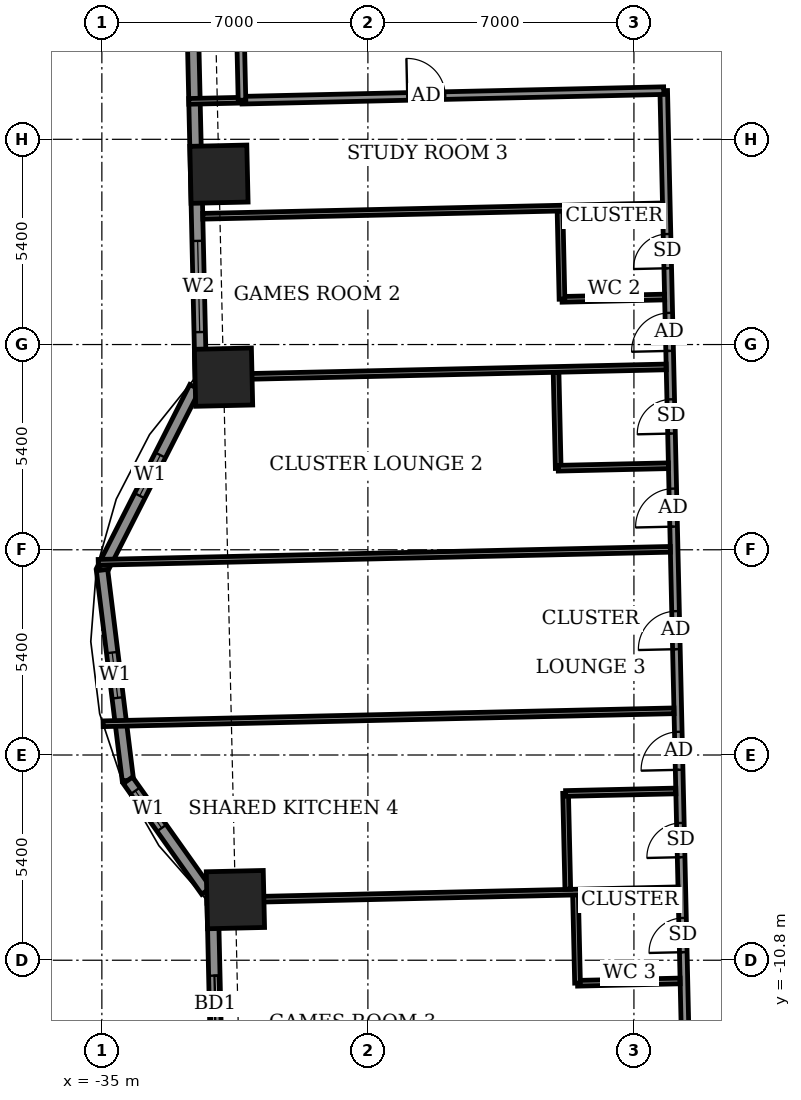
"""IFC4 building model, lengths in metres.
Left out: names, types, materials, properties, quantities, classifications, styles, units other than length and angle.
Written with IfcOpenShell. Run it as: python <this file> out.ifc"""

import sys

from ifc_helpers import new_model, si_unit, direction, frame, frame_2d, origin, origin_2d, place, context, subcontext, project, spatial, rectangle, extrude, element, fill, save


model = new_model("IFC4")
c1 = context("Model", 3, precision=1e-05, world=origin(), true_north=direction((0.0, 1.0)))
c2 = subcontext(c1, "Body", "Model", "MODEL_VIEW")
j1 = project(units=[si_unit("LENGTHUNIT", "METRE"), si_unit("PLANEANGLEUNIT", "RADIAN")], contexts=[c1])
p1 = place(None, origin())
s1 = spatial("IfcSite", under=j1, at=p1, CompositionType="ELEMENT")
p2 = place(p1, origin())
s2 = spatial("IfcBuilding", under=s1, at=p2, CompositionType="ELEMENT")
p3 = place(p2, frame((0.0, 0.0, 48.5)))
s3 = spatial("IfcBuildingStorey", under=s2, at=p3, CompositionType="ELEMENT", Elevation=48.5)
for number, where, z_axis, x_axis in (
    (1, (-31.486, -9.205, -0.55), (0.0, 0.0, 1.0), (0.023, -1.0, 0.0)),
    (2, (-31.919, 9.882, -0.55), (0.0, 0.0, 1.0), (0.023, -1.0, 0.0)),
    (3, (-31.798, 4.542, -0.55), (0.0, 0.0, 1.0), (0.023, -1.0, 0.0)),
):
    element("IfcColumn", number, at=place(p3, frame(where, z_axis=z_axis, x_axis=x_axis)), inside=s3, PredefinedType="COLUMN", context=c2, shape_type="SweptSolid", body=[
        extrude(rectangle(XDim=1.5, YDim=1.5, at=origin_2d()), origin(), (0.0, 0.0, 1.0), 3.6),
    ])
p4 = place(p3, frame((-32.758, 20.399, 0.0), z_axis=(0.0, 0.0, 1.0), x_axis=(0.022668485183, -0.999743036875, 0.0)))
e4 = element("IfcWall", 4, at=p4, inside=s3, PredefinedType="SOLIDWALL", context=c2, shape_type="SweptSolid", body=[
    extrude(rectangle(XDim=15.929, YDim=0.3, at=frame_2d((7.964, 0.0))), origin(), (0.0, 0.0, 1.0), 3.05),
])
p5 = place(p4, frame((2.17, 0.0, 0.0)))
e5 = element("IfcOpeningElement", 5, at=p5, cuts=e4, PredefinedType="OPENING", context=c2, shape_type="SweptSolid", body=[
    extrude(rectangle(XDim=1.5, YDim=2.4, at=frame_2d((0.75, 1.2))), frame((0.0, 0.16, 0.0), z_axis=(0.0, -1.0, 0.0), x_axis=(1.0, 0.0, 0.0)), (0.0, 0.0, 1.0), 0.32),
])
p6 = place(p4, frame((12.275, 0.0, 0.9)))
e6 = element("IfcOpeningElement", 6, at=p6, cuts=e4, PredefinedType="OPENING", context=c2, shape_type="SweptSolid", body=[
    extrude(rectangle(XDim=2.4, YDim=1.5, at=frame_2d((1.2, 0.75))), frame((0.0, 0.16, 0.0), z_axis=(0.0, -1.0, 0.0), x_axis=(1.0, 0.0, 0.0)), (0.0, 0.0, 1.0), 0.32),
])
p7 = place(p3, frame((-32.552, 4.28, 0.0), z_axis=(0.0, 0.0, 1.0), x_axis=(-0.452703975507, -0.891660871946, 0.0)))
e7 = element("IfcWall", 7, at=p7, inside=s3, PredefinedType="SOLIDWALL", context=c2, shape_type="SweptSolid", body=[
    extrude(rectangle(XDim=5.399, YDim=0.3, at=frame_2d((2.699, 0.0))), origin(), (0.0, 0.0, 1.0), 3.05),
])
p8 = place(p7, frame((2.007, 0.0, 0.9)))
e8 = element("IfcOpeningElement", 8, at=p8, cuts=e7, PredefinedType="OPENING", context=c2, shape_type="SweptSolid", body=[
    extrude(rectangle(XDim=1.2, YDim=1.5, at=frame_2d((0.6, 0.75))), frame((0.0, 0.16, 0.0), z_axis=(0.0, -1.0, 0.0), x_axis=(1.0, 0.0, 0.0)), (0.0, 0.0, 1.0), 0.32),
])
p9 = place(p3, frame((-34.996, -0.534, 0.0), z_axis=(0.0, 0.0, 1.0), x_axis=(0.122206978992, -0.992504636909, 0.0)))
e9 = element("IfcWall", 9, at=p9, inside=s3, PredefinedType="SOLIDWALL", context=c2, shape_type="SweptSolid", body=[
    extrude(rectangle(XDim=5.574, YDim=0.3, at=frame_2d((2.787, 0.0))), origin(), (0.0, 0.0, 1.0), 3.05),
])
p10 = place(p9, frame((2.187, 0.0, 0.9)))
e10 = element("IfcOpeningElement", 10, at=p10, cuts=e9, PredefinedType="OPENING", context=c2, shape_type="SweptSolid", body=[
    extrude(rectangle(XDim=1.2, YDim=1.5, at=frame_2d((0.6, 0.75))), frame((0.0, 0.16, 0.0), z_axis=(0.0, -1.0, 0.0), x_axis=(1.0, 0.0, 0.0)), (0.0, 0.0, 1.0), 0.32),
])
p11 = place(p3, frame((-34.315, -6.066, 0.0), z_axis=(0.0, 0.0, 1.0), x_axis=(0.578062893695, -0.815992212544, 0.0)))
e11 = element("IfcWall", 11, at=p11, inside=s3, PredefinedType="SOLIDWALL", context=c2, shape_type="SweptSolid", body=[
    extrude(rectangle(XDim=3.569, YDim=0.3, at=frame_2d((1.784, 0.0))), origin(), (0.0, 0.0, 1.0), 3.05),
])
p12 = place(p11, frame((0.338, 0.0, 0.9)))
e12 = element("IfcOpeningElement", 12, at=p12, cuts=e11, PredefinedType="OPENING", context=c2, shape_type="SweptSolid", body=[
    extrude(rectangle(XDim=1.2, YDim=1.5, at=frame_2d((0.6, 0.75))), frame((0.0, 0.16, 0.0), z_axis=(0.0, -1.0, 0.0), x_axis=(1.0, 0.0, 0.0)), (0.0, 0.0, 1.0), 0.32),
])
p13 = place(p3, frame((-32.087, -9.164, 0.0), z_axis=(0.0, 0.0, 1.0), x_axis=(0.022651102902, -0.999743430855, 0.0)))
e13 = element("IfcWall", 13, at=p13, inside=s3, PredefinedType="SOLIDWALL", context=c2, shape_type="SweptSolid", body=[
    extrude(rectangle(XDim=16.329, YDim=0.3, at=frame_2d((8.165, 0.0))), origin(), (0.0, 0.0, 1.0), 3.05),
])
p14 = place(p13, frame((2.042, 0.0, 0.0)))
e14 = element("IfcOpeningElement", 14, at=p14, cuts=e13, PredefinedType="OPENING", context=c2, shape_type="SweptSolid", body=[
    extrude(rectangle(XDim=1.5, YDim=2.4, at=frame_2d((0.75, 1.2))), frame((0.0, 0.16, 0.0), z_axis=(0.0, -1.0, 0.0), x_axis=(1.0, 0.0, 0.0)), (0.0, 0.0, 1.0), 0.32),
])
p15 = place(p13, frame((7.367, 0.0, 0.9)))
e15 = element("IfcOpeningElement", 15, at=p15, cuts=e13, PredefinedType="OPENING", context=c2, shape_type="SweptSolid", body=[
    extrude(rectangle(XDim=2.4, YDim=1.5, at=frame_2d((1.2, 0.75))), frame((0.0, 0.16, 0.0), z_axis=(0.0, -1.0, 0.0), x_axis=(1.0, 0.0, 0.0)), (0.0, 0.0, 1.0), 0.32),
])
p16 = place(p3, frame((-34.032, 12.618, 0.0), z_axis=(0.0, 0.0, 1.0), x_axis=(-0.022662255828, 0.999743178102, 0.0)))
e16 = element("IfcWall", 16, at=p16, inside=s3, PredefinedType="USERDEFINED", context=c2, shape_type="SweptSolid", body=[
    extrude(rectangle(XDim=6.0, YDim=0.55, at=frame_2d((3.0, 0.0))), origin(), (0.0, 0.0, 1.0), 0.8),
])
p17 = place(p3, frame((-19.589, -15.562, 0.0), z_axis=(0.0, 0.0, 1.0), x_axis=(-0.02267447203, 0.999742901109, 0.0)))
e17 = element("IfcWall", 17, at=p17, inside=s3, PredefinedType="PARTITIONING", context=c2, shape_type="SweptSolid", body=[
    extrude(rectangle(XDim=27.65, YDim=0.2, at=frame_2d((13.825, 0.0))), origin(), (0.0, 0.0, 1.0), 3.05),
])
p18 = place(p17, frame((20.8, 0.0, 0.0)))
e18 = element("IfcOpeningElement", 18, at=p18, cuts=e17, PredefinedType="OPENING", context=c2, shape_type="SweptSolid", body=[
    extrude(rectangle(XDim=1.0, YDim=2.1, at=frame_2d((0.5, 1.05))), frame((0.0, 0.11, 0.0), z_axis=(0.0, -1.0, 0.0), x_axis=(1.0, 0.0, 0.0)), (0.0, 0.0, 1.0), 0.22),
])
p19 = place(p17, frame((22.975, 0.0, 0.0)))
e19 = element("IfcOpeningElement", 19, at=p19, cuts=e17, PredefinedType="OPENING", context=c2, shape_type="SweptSolid", body=[
    extrude(rectangle(XDim=0.9, YDim=2.1, at=frame_2d((0.45, 1.05))), frame((0.0, 0.11, 0.0), z_axis=(0.0, -1.0, 0.0), x_axis=(1.0, 0.0, 0.0)), (0.0, 0.0, 1.0), 0.22),
])
p20 = place(p17, frame((16.175, 0.0, 0.0)))
e20 = element("IfcOpeningElement", 20, at=p20, cuts=e17, PredefinedType="OPENING", context=c2, shape_type="SweptSolid", body=[
    extrude(rectangle(XDim=1.0, YDim=2.1, at=frame_2d((0.5, 1.05))), frame((0.0, 0.11, 0.0), z_axis=(0.0, -1.0, 0.0), x_axis=(1.0, 0.0, 0.0)), (0.0, 0.0, 1.0), 0.22),
])
p21 = place(p17, frame((18.625, 0.0, 0.0)))
e21 = element("IfcOpeningElement", 21, at=p21, cuts=e17, PredefinedType="OPENING", context=c2, shape_type="SweptSolid", body=[
    extrude(rectangle(XDim=0.9, YDim=2.1, at=frame_2d((0.45, 1.05))), frame((0.0, 0.11, 0.0), z_axis=(0.0, -1.0, 0.0), x_axis=(1.0, 0.0, 0.0)), (0.0, 0.0, 1.0), 0.22),
])
p22 = place(p17, frame((12.95, 0.0, 0.0)))
e22 = element("IfcOpeningElement", 22, at=p22, cuts=e17, PredefinedType="OPENING", context=c2, shape_type="SweptSolid", body=[
    extrude(rectangle(XDim=1.0, YDim=2.1, at=frame_2d((0.5, 1.05))), frame((0.0, 0.11, 0.0), z_axis=(0.0, -1.0, 0.0), x_axis=(1.0, 0.0, 0.0)), (0.0, 0.0, 1.0), 0.22),
])
p23 = place(p17, frame((9.775, 0.0, 0.0)))
e23 = element("IfcOpeningElement", 23, at=p23, cuts=e17, PredefinedType="OPENING", context=c2, shape_type="SweptSolid", body=[
    extrude(rectangle(XDim=1.0, YDim=2.1, at=frame_2d((0.5, 1.05))), frame((0.0, 0.11, 0.0), z_axis=(0.0, -1.0, 0.0), x_axis=(1.0, 0.0, 0.0)), (0.0, 0.0, 1.0), 0.22),
])
p24 = place(p17, frame((7.475, 0.0, 0.0)))
e24 = element("IfcOpeningElement", 24, at=p24, cuts=e17, PredefinedType="OPENING", context=c2, shape_type="SweptSolid", body=[
    extrude(rectangle(XDim=0.9, YDim=2.1, at=frame_2d((0.45, 1.05))), frame((0.0, 0.11, 0.0), z_axis=(0.0, -1.0, 0.0), x_axis=(1.0, 0.0, 0.0)), (0.0, 0.0, 1.0), 0.22),
])
p25 = place(p17, frame((1.612, 0.0, 0.0)))
e25 = element("IfcOpeningElement", 25, at=p25, cuts=e17, PredefinedType="OPENING", context=c2, shape_type="SweptSolid", body=[
    extrude(rectangle(XDim=1.0, YDim=2.1, at=frame_2d((0.5, 1.05))), frame((0.0, 0.11, 0.0), z_axis=(0.0, -1.0, 0.0), x_axis=(1.0, 0.0, 0.0)), (0.0, 0.0, 1.0), 0.22),
])
p26 = place(p17, frame((4.975, 0.0, 0.0)))
e26 = element("IfcOpeningElement", 26, at=p26, cuts=e17, PredefinedType="OPENING", context=c2, shape_type="SweptSolid", body=[
    extrude(rectangle(XDim=0.9, YDim=2.1, at=frame_2d((0.45, 1.05))), frame((0.0, 0.11, 0.0), z_axis=(0.0, -1.0, 0.0), x_axis=(1.0, 0.0, 0.0)), (0.0, 0.0, 1.0), 0.22),
])
p27 = place(p3, frame((-22.484, -11.406, 0.0), z_axis=(0.0, 0.0, 1.0), x_axis=(0.999744396973, 0.02260842146, 0.0)))
e27 = element("IfcWall", 27, at=p27, inside=s3, PredefinedType="PARTITIONING", context=c2, shape_type="SweptSolid", body=[
    extrude(rectangle(XDim=2.7, YDim=0.15, at=frame_2d((1.35, 0.0))), origin(), (0.0, 0.0, 1.0), 3.05),
])
p28 = place(p3, frame((-22.484, -11.401, 0.0), z_axis=(0.0, 0.0, 1.0), x_axis=(-0.022895561926, 0.999737862264, 0.0)))
e28 = element("IfcWall", 28, at=p28, inside=s3, PredefinedType="PARTITIONING", context=c2, shape_type="SweptSolid", body=[
    extrude(rectangle(XDim=2.324, YDim=0.15, at=frame_2d((1.162, 0.0))), origin(), (0.0, 0.0, 1.0), 3.05),
])
p29 = place(p3, frame((-32.236, -9.227, 0.0), z_axis=(0.0, 0.0, 1.0), x_axis=(0.999743195783, 0.022661475803, 0.0)))
e29 = element("IfcWall", 29, at=p29, inside=s3, PredefinedType="PARTITIONING", context=c2, shape_type="SweptSolid", body=[
    extrude(rectangle(XDim=12.4, YDim=0.15, at=frame_2d((6.2, 0.0))), origin(), (0.0, 0.0, 1.0), 3.05),
])
p30 = place(p3, frame((-22.74, -8.931, 0.0), z_axis=(0.0, 0.0, 1.0), x_axis=(-0.023015762656, 0.999735102249, 0.0)))
e30 = element("IfcWall", 30, at=p30, inside=s3, PredefinedType="PARTITIONING", context=c2, shape_type="SweptSolid", body=[
    extrude(rectangle(XDim=2.525, YDim=0.15, at=frame_2d((1.262, 0.0))), origin(), (0.0, 0.0, 1.0), 3.05),
])
p31 = place(p3, frame((-22.797, -6.412, 0.0), z_axis=(0.0, 0.0, 1.0), x_axis=(0.999739701447, 0.022815112345, 0.0)))
e31 = element("IfcWall", 31, at=p31, inside=s3, PredefinedType="PARTITIONING", context=c2, shape_type="SweptSolid", body=[
    extrude(rectangle(XDim=2.9, YDim=0.15, at=frame_2d((1.45, 0.0))), origin(), (0.0, 0.0, 1.0), 3.05),
])
p32 = place(p3, frame((-34.967, -4.578, 0.0), z_axis=(0.0, 0.0, 1.0), x_axis=(0.999742690494, 0.022683756395, 0.0)))
e32 = element("IfcWall", 32, at=p32, inside=s3, PredefinedType="PARTITIONING", context=c2, shape_type="SweptSolid", body=[
    extrude(rectangle(XDim=15.025, YDim=0.15, at=frame_2d((7.512, 0.0))), origin(), (0.0, 0.0, 1.0), 2.1),
])
p33 = place(p3, frame((-35.095, -0.33, 0.0), z_axis=(0.0, 0.0, 1.0), x_axis=(0.999741944356, 0.022716617157, 0.0)))
e33 = element("IfcWall", 33, at=p33, inside=s3, PredefinedType="PARTITIONING", context=c2, shape_type="SweptSolid", body=[
    extrude(rectangle(XDim=15.057, YDim=0.15, at=frame_2d((7.528, 0.0))), origin(), (0.0, 0.0, 1.0), 2.1),
])
p34 = place(p3, frame((-22.992, 2.141, 0.0), z_axis=(0.0, 0.0, 1.0), x_axis=(-0.022629142889, 0.99974392816, 0.0)))
e34 = element("IfcWall", 34, at=p34, inside=s3, PredefinedType="PARTITIONING", context=c2, shape_type="SweptSolid", body=[
    extrude(rectangle(XDim=2.525, YDim=0.15, at=frame_2d((1.262, 0.0))), origin(), (0.0, 0.0, 1.0), 3.05),
])
p35 = place(p3, frame((-22.992, 2.146, 0.0), z_axis=(0.0, 0.0, 1.0), x_axis=(0.999749340989, 0.022388729138, 0.0)))
e35 = element("IfcWall", 35, at=p35, inside=s3, PredefinedType="PARTITIONING", context=c2, shape_type="SweptSolid", body=[
    extrude(rectangle(XDim=2.901, YDim=0.15, at=frame_2d((1.45, 0.0))), origin(), (0.0, 0.0, 1.0), 3.05),
])
p36 = place(p3, frame((-32.248, 4.536, 0.0), z_axis=(0.0, 0.0, 1.0), x_axis=(0.999741439573, 0.022738821441, 0.0)))
e36 = element("IfcWall", 36, at=p36, inside=s3, PredefinedType="PARTITIONING", context=c2, shape_type="SweptSolid", body=[
    extrude(rectangle(XDim=12.1, YDim=0.15, at=frame_2d((6.05, 0.0))), origin(), (0.0, 0.0, 1.0), 3.05),
])
p37 = place(p3, frame((-22.892, 6.589, 0.0), z_axis=(0.0, 0.0, 1.0), x_axis=(0.999746436932, 0.022518033722, 0.0)))
e37 = element("IfcWall", 37, at=p37, inside=s3, PredefinedType="PARTITIONING", context=c2, shape_type="SweptSolid", body=[
    extrude(rectangle(XDim=2.7, YDim=0.15, at=frame_2d((1.35, 0.0))), origin(), (0.0, 0.0, 1.0), 3.05),
])
p38 = place(p3, frame((-22.893, 6.594, 0.0), z_axis=(0.0, 0.0, 1.0), x_axis=(-0.022370700241, 0.999749744571, 0.0)))
e38 = element("IfcWall", 38, at=p38, inside=s3, PredefinedType="PARTITIONING", context=c2, shape_type="SweptSolid", body=[
    extrude(rectangle(XDim=2.324, YDim=0.15, at=frame_2d((1.162, 0.0))), origin(), (0.0, 0.0, 1.0), 3.05),
])
p39 = place(p3, frame((-32.344, 8.775, 0.0), z_axis=(0.0, 0.0, 1.0), x_axis=(0.999741387404, 0.022741115019, 0.0)))
e39 = element("IfcWall", 39, at=p39, inside=s3, PredefinedType="PARTITIONING", context=c2, shape_type="SweptSolid", body=[
    extrude(rectangle(XDim=12.099, YDim=0.15, at=frame_2d((6.05, 0.0))), origin(), (0.0, 0.0, 1.0), 2.55),
])
p40 = place(p3, frame((-32.713, 11.798, 0.0), z_axis=(0.0, 0.0, 1.0), x_axis=(0.999756172383, 0.022081571112, 0.0)))
e40 = element("IfcWall", 40, at=p40, inside=s3, PredefinedType="PARTITIONING", context=c2, shape_type="SweptSolid", body=[
    extrude(rectangle(XDim=1.404, YDim=0.15, at=frame_2d((0.702, 0.0))), origin(), (0.0, 0.0, 1.0), 2.55),
])
p41 = place(p3, frame((-31.313, 11.829, 0.0), z_axis=(0.0, 0.0, 1.0), x_axis=(0.999742346277, 0.022698921993, 0.0)))
e41 = element("IfcWall", 41, at=p41, inside=s3, PredefinedType="PARTITIONING", context=c2, shape_type="SweptSolid", body=[
    extrude(rectangle(XDim=11.1, YDim=0.2, at=frame_2d((5.55, 0.0))), origin(), (0.0, 0.0, 1.0), 3.05),
])
p42 = place(p41, frame((4.35, 0.0, 0.0)))
e42 = element("IfcOpeningElement", 42, at=p42, cuts=e41, PredefinedType="OPENING", context=c2, shape_type="SweptSolid", body=[
    extrude(rectangle(XDim=1.0, YDim=2.1, at=frame_2d((0.5, 1.05))), frame((0.0, 0.11, 0.0), z_axis=(0.0, -1.0, 0.0), x_axis=(1.0, 0.0, 0.0)), (0.0, 0.0, 1.0), 0.22),
])
p43 = place(p3, frame((-31.313, 11.829, 0.0), z_axis=(0.0, 0.0, 1.0), x_axis=(-0.022617910375, 0.999744182344, 0.0)))
e43 = element("IfcWall", 43, at=p43, inside=s3, PredefinedType="PARTITIONING", context=c2, shape_type="SweptSolid", body=[
    extrude(rectangle(XDim=1.5, YDim=0.2, at=frame_2d((0.75, 0.0))), origin(), (0.0, 0.0, 1.0), 3.05),
])
p44 = place(p6, origin())
e44 = element("IfcWindow", 44, at=p44, inside=s3, PartitioningType="DOUBLE_PANEL_VERTICAL", PredefinedType="WINDOW", context=c2, shape_type="SweptSolid", body=[
    extrude(rectangle(XDim=2.4, YDim=1.5, at=frame_2d((1.2, 0.75))), frame((0.0, 0.03, 0.0), z_axis=(0.0, -1.0, 0.0), x_axis=(1.0, 0.0, 0.0)), (0.0, 0.0, 1.0), 0.06),
])
fill(e6, e44)
p45 = place(p8, origin())
e45 = element("IfcWindow", 45, at=p45, inside=s3, PartitioningType="SINGLE_PANEL", PredefinedType="WINDOW", context=c2, shape_type="SweptSolid", body=[
    extrude(rectangle(XDim=1.2, YDim=1.5, at=frame_2d((0.6, 0.75))), frame((0.0, 0.03, 0.0), z_axis=(0.0, -1.0, 0.0), x_axis=(1.0, 0.0, 0.0)), (0.0, 0.0, 1.0), 0.06),
])
fill(e8, e45)
p46 = place(p10, origin())
e46 = element("IfcWindow", 46, at=p46, inside=s3, PartitioningType="SINGLE_PANEL", PredefinedType="WINDOW", context=c2, shape_type="SweptSolid", body=[
    extrude(rectangle(XDim=1.2, YDim=1.5, at=frame_2d((0.6, 0.75))), frame((0.0, 0.03, 0.0), z_axis=(0.0, -1.0, 0.0), x_axis=(1.0, 0.0, 0.0)), (0.0, 0.0, 1.0), 0.06),
])
fill(e10, e46)
p47 = place(p12, origin())
e47 = element("IfcWindow", 47, at=p47, inside=s3, PartitioningType="SINGLE_PANEL", PredefinedType="WINDOW", context=c2, shape_type="SweptSolid", body=[
    extrude(rectangle(XDim=1.2, YDim=1.5, at=frame_2d((0.6, 0.75))), frame((0.0, 0.03, 0.0), z_axis=(0.0, -1.0, 0.0), x_axis=(1.0, 0.0, 0.0)), (0.0, 0.0, 1.0), 0.06),
])
fill(e12, e47)
p48 = place(p14, origin())
e48 = element("IfcDoor", 48, at=p48, inside=s3, OperationType="SLIDING_TO_LEFT", PredefinedType="DOOR", context=c2, shape_type="SweptSolid", body=[
    extrude(rectangle(XDim=1.5, YDim=2.4, at=frame_2d((0.75, 1.2))), frame((0.0, 0.025, 0.0), z_axis=(0.0, -1.0, 0.0), x_axis=(1.0, 0.0, 0.0)), (0.0, 0.0, 1.0), 0.05),
])
fill(e14, e48)
p49 = place(p42, origin())
e49 = element("IfcDoor", 49, at=p49, inside=s3, OperationType="SINGLE_SWING_RIGHT", PredefinedType="DOOR", context=c2, shape_type="SweptSolid", body=[
    extrude(rectangle(XDim=1.0, YDim=2.1, at=frame_2d((0.5, 1.05))), frame((0.0, 0.025, 0.0), z_axis=(0.0, -1.0, 0.0), x_axis=(1.0, 0.0, 0.0)), (0.0, 0.0, 1.0), 0.05),
])
fill(e42, e49)
p50 = place(p18, origin())
e50 = element("IfcDoor", 50, at=p50, inside=s3, OperationType="SINGLE_SWING_LEFT", PredefinedType="DOOR", context=c2, shape_type="SweptSolid", body=[
    extrude(rectangle(XDim=1.0, YDim=2.1, at=frame_2d((0.5, 1.05))), frame((0.0, 0.025, 0.0), z_axis=(0.0, -1.0, 0.0), x_axis=(1.0, 0.0, 0.0)), (0.0, 0.0, 1.0), 0.05),
])
fill(e18, e50)
p51 = place(p19, origin())
e51 = element("IfcDoor", 51, at=p51, inside=s3, OperationType="SINGLE_SWING_RIGHT", PredefinedType="DOOR", context=c2, shape_type="SweptSolid", body=[
    extrude(rectangle(XDim=0.9, YDim=2.1, at=frame_2d((0.45, 1.05))), frame((0.0, 0.025, 0.0), z_axis=(0.0, -1.0, 0.0), x_axis=(1.0, 0.0, 0.0)), (0.0, 0.0, 1.0), 0.05),
])
fill(e19, e51)
p52 = place(p20, origin())
e52 = element("IfcDoor", 52, at=p52, inside=s3, OperationType="SINGLE_SWING_RIGHT", PredefinedType="DOOR", context=c2, shape_type="SweptSolid", body=[
    extrude(rectangle(XDim=1.0, YDim=2.1, at=frame_2d((0.5, 1.05))), frame((0.0, 0.025, 0.0), z_axis=(0.0, -1.0, 0.0), x_axis=(1.0, 0.0, 0.0)), (0.0, 0.0, 1.0), 0.05),
])
fill(e20, e52)
p53 = place(p21, origin())
e53 = element("IfcDoor", 53, at=p53, inside=s3, OperationType="SINGLE_SWING_LEFT", PredefinedType="DOOR", context=c2, shape_type="SweptSolid", body=[
    extrude(rectangle(XDim=0.9, YDim=2.1, at=frame_2d((0.45, 1.05))), frame((0.0, 0.025, 0.0), z_axis=(0.0, -1.0, 0.0), x_axis=(1.0, 0.0, 0.0)), (0.0, 0.0, 1.0), 0.05),
])
fill(e21, e53)
p54 = place(p22, origin())
e54 = element("IfcDoor", 54, at=p54, inside=s3, OperationType="SINGLE_SWING_LEFT", PredefinedType="DOOR", context=c2, shape_type="SweptSolid", body=[
    extrude(rectangle(XDim=1.0, YDim=2.1, at=frame_2d((0.5, 1.05))), frame((0.0, 0.025, 0.0), z_axis=(0.0, -1.0, 0.0), x_axis=(1.0, 0.0, 0.0)), (0.0, 0.0, 1.0), 0.05),
])
fill(e22, e54)
p55 = place(p23, origin())
e55 = element("IfcDoor", 55, at=p55, inside=s3, OperationType="SINGLE_SWING_RIGHT", PredefinedType="DOOR", context=c2, shape_type="SweptSolid", body=[
    extrude(rectangle(XDim=1.0, YDim=2.1, at=frame_2d((0.5, 1.05))), frame((0.0, 0.025, 0.0), z_axis=(0.0, -1.0, 0.0), x_axis=(1.0, 0.0, 0.0)), (0.0, 0.0, 1.0), 0.05),
])
fill(e23, e55)
p56 = place(p24, origin())
e56 = element("IfcDoor", 56, at=p56, inside=s3, OperationType="SINGLE_SWING_RIGHT", PredefinedType="DOOR", context=c2, shape_type="SweptSolid", body=[
    extrude(rectangle(XDim=0.9, YDim=2.1, at=frame_2d((0.45, 1.05))), frame((0.0, 0.025, 0.0), z_axis=(0.0, -1.0, 0.0), x_axis=(1.0, 0.0, 0.0)), (0.0, 0.0, 1.0), 0.05),
])
fill(e24, e56)
p57 = place(p26, origin())
e57 = element("IfcDoor", 57, at=p57, inside=s3, OperationType="SINGLE_SWING_LEFT", PredefinedType="DOOR", context=c2, shape_type="SweptSolid", body=[
    extrude(rectangle(XDim=0.9, YDim=2.1, at=frame_2d((0.45, 1.05))), frame((0.0, 0.025, 0.0), z_axis=(0.0, -1.0, 0.0), x_axis=(1.0, 0.0, 0.0)), (0.0, 0.0, 1.0), 0.05),
])
fill(e26, e57)
save(model, sys.argv[1])
